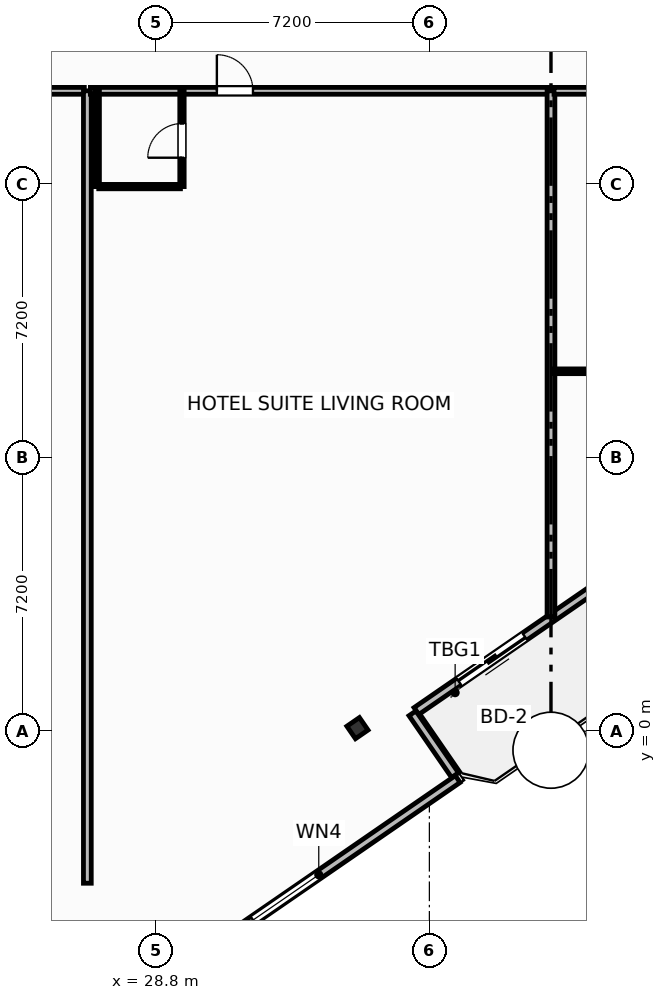
"""IFC4 building model, lengths in metres.
Left out: names, types, materials, properties, quantities, classifications, styles, units other than length and angle.
Written with IfcOpenShell. Run it as: python <this file> out.ifc"""

import sys

from ifc_helpers import new_model, si_unit, direction, frame, frame_2d, origin, origin_2d, place, context, subcontext, project, spatial, rectangle, i_section, extrude, element, fill, save


model = new_model("IFC4")
c1 = context("Model", 3, precision=1e-05, world=origin(), true_north=direction((0.0, 1.0)))
c2 = subcontext(c1, "Body", "Model", "MODEL_VIEW")
j1 = project(units=[si_unit("LENGTHUNIT", "METRE"), si_unit("PLANEANGLEUNIT", "RADIAN")], contexts=[c1])
p1 = place(None, origin())
s1 = spatial("IfcSite", under=j1, at=p1, CompositionType="ELEMENT")
p2 = place(p1, origin())
s2 = spatial("IfcBuilding", under=s1, at=p2, CompositionType="ELEMENT")
p3 = place(p2, frame((0.0, 0.0, 273.0)))
s3 = spatial("IfcBuildingStorey", under=s2, at=p3, CompositionType="ELEMENT", Elevation=273.0)
p4 = place(p3, frame((34.107, 0.081, 0.0), z_axis=(0.0, 0.0, 1.0), x_axis=(0.823532597628, 0.567268949127, 0.0)))
e1 = element("IfcColumn", 1, at=p4, inside=s3, PredefinedType="COLUMN", context=c2, shape_type="SweptSolid", body=[
    extrude(i_section(OverallWidth=0.401, OverallDepth=0.399, WebThickness=0.025, FlangeThickness=0.04, FilletRadius=0.022, at=origin_2d()), origin(), (0.0, 0.0, 1.0), 3.7),
])
p5 = place(p3, frame((40.244, 3.688, 0.0), z_axis=(0.0, 0.0, 1.0), x_axis=(-0.823541290762, -0.567256328665, 0.0)))
e2 = element("IfcWall", 2, at=p5, inside=s3, PredefinedType="SOLIDWALL", context=c2, shape_type="SweptSolid", body=[
    extrude(rectangle(XDim=5.567, YDim=0.22, at=frame_2d((2.784, 0.0))), origin(), (0.0, 0.0, 1.0), 2.73),
])
p6 = place(p5, frame((2.107, 0.0, 0.0)))
e3 = element("IfcOpeningElement", 3, at=p6, cuts=e2, PredefinedType="OPENING", context=c2, shape_type="SweptSolid", body=[
    extrude(rectangle(XDim=2.1, YDim=2.3, at=frame_2d((1.05, 1.15))), frame((0.0, 0.12, 0.0), z_axis=(0.0, -1.0, 0.0), x_axis=(1.0, 0.0, 0.0)), (0.0, 0.0, 1.0), 0.24),
])
p7 = place(p3, frame((27.704, -7.488, 0.0), z_axis=(0.0, 0.0, 1.0), x_axis=(0.823529068157, 0.567274073003, 0.0)))
e4 = element("IfcWall", 4, at=p7, inside=s3, PredefinedType="SOLIDWALL", context=c2, shape_type="SweptSolid", body=[
    extrude(rectangle(XDim=10.98, YDim=0.22, at=frame_2d((5.49, 0.0))), origin(), (0.0, 0.0, 1.0), 2.73),
])
p8 = place(p7, frame((4.44, 0.0, 0.8)))
e5 = element("IfcOpeningElement", 5, at=p8, cuts=e4, PredefinedType="OPENING", context=c2, shape_type="SweptSolid", body=[
    extrude(rectangle(XDim=2.1, YDim=1.75, at=frame_2d((1.05, 0.875))), frame((0.0, 0.12, 0.0), z_axis=(0.0, -1.0, 0.0), x_axis=(1.0, 0.0, 0.0)), (0.0, 0.0, 1.0), 0.24),
])
p9 = place(p3, frame((36.675, -1.156, 0.0), z_axis=(0.0, 0.0, 1.0), x_axis=(-0.567215821234, 0.823569190865, 0.0)))
e6 = element("IfcWall", 6, at=p9, inside=s3, PredefinedType="SOLIDWALL", context=c2, shape_type="SweptSolid", body=[
    extrude(rectangle(XDim=1.975, YDim=0.22, at=frame_2d((0.988, 0.0))), origin(), (0.0, 0.0, 1.0), 2.73),
])
p10 = place(p3, frame((5.038, 16.85, 0.0), z_axis=(0.0, 0.0, 1.0), x_axis=(1.0, 0.0, 0.0)))
e7 = element("IfcWall", 7, at=p10, inside=s3, PredefinedType="PARTITIONING", context=c2, shape_type="SweptSolid", body=[
    extrude(rectangle(XDim=21.882, YDim=0.18, at=frame_2d((10.941, 0.0))), origin(), (0.0, 0.0, 1.0), 2.739),
])
p11 = place(p10, frame((16.725, 0.0, 0.0)))
e8 = element("IfcOpeningElement", 8, at=p11, cuts=e7, PredefinedType="OPENING", context=c2, shape_type="SweptSolid", body=[
    extrude(rectangle(XDim=0.95, YDim=2.15, at=frame_2d((0.475, 1.075))), frame((0.0, 0.1, 0.0), z_axis=(0.0, -1.0, 0.0), x_axis=(1.0, 0.0, 0.0)), (0.0, 0.0, 1.0), 0.2),
])
p12 = place(p3, frame((27.0, -4.0, 0.0), z_axis=(0.0, 0.0, 1.0), x_axis=(0.0, 1.0, 0.0)))
e9 = element("IfcWall", 9, at=p12, inside=s3, PredefinedType="PARTITIONING", context=c2, shape_type="SweptSolid", body=[
    extrude(rectangle(XDim=20.85, YDim=0.205, at=frame_2d((10.425, 0.0))), origin(), (0.0, 0.0, 1.0), 3.45),
])
p13 = place(p3, frame((27.08, 16.85, 0.0), z_axis=(0.0, 0.0, 1.0), x_axis=(1.0, 0.0, 0.0)))
e10 = element("IfcWall", 10, at=p13, inside=s3, PredefinedType="PARTITIONING", context=c2, shape_type="SweptSolid", body=[
    extrude(rectangle(XDim=12.04, YDim=0.18, at=frame_2d((6.02, 0.0))), origin(), (0.0, 0.0, 1.0), 3.45),
])
p14 = place(p13, frame((3.328, 0.0, 0.0)))
e11 = element("IfcOpeningElement", 11, at=p14, cuts=e10, PredefinedType="OPENING", context=c2, shape_type="SweptSolid", body=[
    extrude(rectangle(XDim=0.95, YDim=2.15, at=frame_2d((0.475, 1.075))), frame((0.0, 0.1, 0.0), z_axis=(0.0, -1.0, 0.0), x_axis=(1.0, 0.0, 0.0)), (0.0, 0.0, 1.0), 0.2),
])
p15 = place(p3, frame((27.3, 14.33, 0.0), z_axis=(0.0, 0.0, 1.0), x_axis=(1.0, 0.0, 0.0)))
e12 = element("IfcWall", 12, at=p15, inside=s3, PredefinedType="PARTITIONING", context=c2, shape_type="SweptSolid", body=[
    extrude(rectangle(XDim=2.15, YDim=0.115, at=frame_2d((1.075, 0.0))), origin(), (0.0, 0.0, 1.0), 3.45),
])
p16 = place(p3, frame((29.49, 14.33, 0.0), z_axis=(0.0, 0.0, 1.0), x_axis=(0.0, 1.0, 0.0)))
e13 = element("IfcWall", 13, at=p16, inside=s3, PredefinedType="PARTITIONING", context=c2, shape_type="SweptSolid", body=[
    extrude(rectangle(XDim=2.52, YDim=0.115, at=frame_2d((1.26, 0.0))), origin(), (0.0, 0.0, 1.0), 3.45),
])
p17 = place(p16, frame((0.76, 0.0, 0.0)))
e14 = element("IfcOpeningElement", 14, at=p17, cuts=e13, PredefinedType="OPENING", context=c2, shape_type="SweptSolid", body=[
    extrude(rectangle(XDim=0.9, YDim=2.05, at=frame_2d((0.45, 1.025))), frame((0.0, 0.067, 0.0), z_axis=(0.0, -1.0, 0.0), x_axis=(1.0, 0.0, 0.0)), (0.0, 0.0, 1.0), 0.135),
])
p18 = place(p3, frame((27.26, 14.33, 0.0), z_axis=(0.0, 0.0, 1.0), x_axis=(0.0, 1.0, 0.0)))
e15 = element("IfcWall", 15, at=p18, inside=s3, PredefinedType="PARTITIONING", context=c2, shape_type="SweptSolid", body=[
    extrude(rectangle(XDim=2.52, YDim=0.115, at=frame_2d((1.26, 0.0))), origin(), (0.0, 0.0, 1.0), 3.45),
])
p19 = place(p3, frame((39.2, 3.006, 0.0), z_axis=(0.0, 0.0, 1.0), x_axis=(0.0, 1.0, 0.0)))
e16 = element("IfcWall", 16, at=p19, inside=s3, PredefinedType="PARTITIONING", context=c2, shape_type="SweptSolid", body=[
    extrude(rectangle(XDim=13.844, YDim=0.205, at=frame_2d((6.922, 0.0))), origin(), (0.0, 0.0, 1.0), 3.45),
])
p20 = place(p3, frame((39.28, 9.47, 0.0), z_axis=(0.0, 0.0, 1.0), x_axis=(1.0, 0.0, 0.0)))
e17 = element("IfcWall", 17, at=p20, inside=s3, PredefinedType="PARTITIONING", context=c2, shape_type="SweptSolid", body=[
    extrude(rectangle(XDim=7.27, YDim=0.125, at=frame_2d((3.635, 0.0))), origin(), (0.0, 0.0, 1.0), 3.45),
])
p21 = place(p20, frame((3.271, 0.0, 0.0)))
e18 = element("IfcOpeningElement", 18, at=p21, cuts=e17, PredefinedType="OPENING", context=c2, shape_type="SweptSolid", body=[
    extrude(rectangle(XDim=0.92, YDim=2.05, at=frame_2d((0.46, 1.025))), frame((0.0, 0.073, 0.0), z_axis=(0.0, -1.0, 0.0), x_axis=(1.0, 0.0, 0.0)), (0.0, 0.0, 1.0), 0.145),
])
p22 = place(p3, frame((39.28, 16.85, 0.0), z_axis=(0.0, 0.0, 1.0), x_axis=(1.0, 0.0, 0.0)))
e19 = element("IfcWall", 19, at=p22, inside=s3, PredefinedType="PARTITIONING", context=c2, shape_type="SweptSolid", body=[
    extrude(rectangle(XDim=12.14, YDim=0.18, at=frame_2d((6.07, 0.0))), origin(), (0.0, 0.0, 1.0), 3.45),
])
p23 = place(p22, frame((3.135, 0.0, 0.0)))
e20 = element("IfcOpeningElement", 20, at=p23, cuts=e19, PredefinedType="OPENING", context=c2, shape_type="SweptSolid", body=[
    extrude(rectangle(XDim=1.0, YDim=2.2, at=frame_2d((0.5, 1.1))), frame((0.0, 0.1, 0.0), z_axis=(0.0, -1.0, 0.0), x_axis=(1.0, 0.0, 0.0)), (0.0, 0.0, 1.0), 0.2),
])
p24 = place(p6, origin())
e21 = element("IfcDoor", 21, at=p24, inside=s3, OperationType="SLIDING_TO_LEFT", PredefinedType="DOOR", context=c2, shape_type="SweptSolid", body=[
    extrude(rectangle(XDim=2.1, YDim=2.3, at=frame_2d((1.05, 1.15))), frame((0.0, 0.025, 0.0), z_axis=(0.0, -1.0, 0.0), x_axis=(1.0, 0.0, 0.0)), (0.0, 0.0, 1.0), 0.05),
])
fill(e3, e21)
p25 = place(p8, origin())
e22 = element("IfcWindow", 22, at=p25, inside=s3, PartitioningType="SINGLE_PANEL", PredefinedType="WINDOW", context=c2, shape_type="SweptSolid", body=[
    extrude(rectangle(XDim=2.1, YDim=1.75, at=frame_2d((1.05, 0.875))), frame((0.0, 0.03, 0.0), z_axis=(0.0, -1.0, 0.0), x_axis=(1.0, 0.0, 0.0)), (0.0, 0.0, 1.0), 0.06),
])
fill(e5, e22)
p26 = place(p14, origin())
e23 = element("IfcDoor", 23, at=p26, inside=s3, OperationType="SINGLE_SWING_LEFT", PredefinedType="DOOR", context=c2, shape_type="SweptSolid", body=[
    extrude(rectangle(XDim=0.95, YDim=2.15, at=frame_2d((0.475, 1.075))), frame((0.0, 0.025, 0.0), z_axis=(0.0, -1.0, 0.0), x_axis=(1.0, 0.0, 0.0)), (0.0, 0.0, 1.0), 0.05),
])
fill(e11, e23)
p27 = place(p17, origin())
e24 = element("IfcDoor", 24, at=p27, inside=s3, OperationType="SINGLE_SWING_LEFT", PredefinedType="DOOR", context=c2, shape_type="SweptSolid", body=[
    extrude(rectangle(XDim=0.9, YDim=2.05, at=frame_2d((0.45, 1.025))), frame((0.0, 0.025, 0.0), z_axis=(0.0, -1.0, 0.0), x_axis=(1.0, 0.0, 0.0)), (0.0, 0.0, 1.0), 0.05),
])
fill(e14, e24)
save(model, sys.argv[1])
